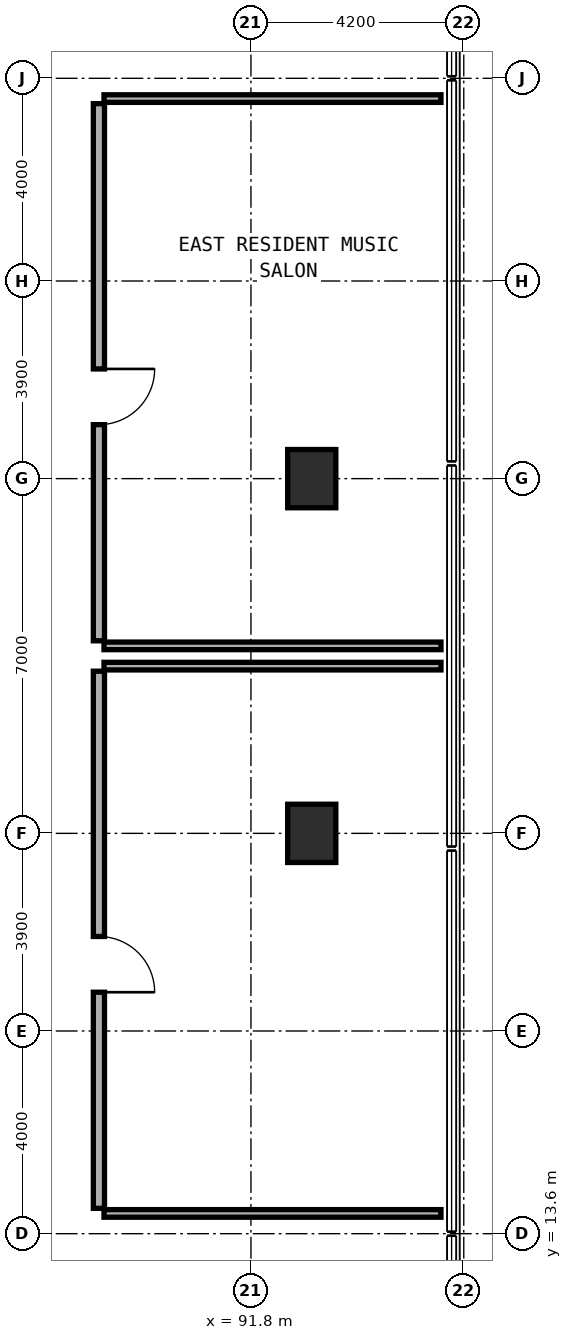
"""IFC4 building model, lengths in metres.
Left out: names, types, materials, properties, quantities, classifications, styles, units other than length and angle.
Written with IfcOpenShell. Run it as: python <this file> out.ifc"""

import sys

from ifc_helpers import new_model, si_unit, direction, frame, frame_2d, origin, origin_2d, place, context, subcontext, project, spatial, rectangle, extrude, element, fill, save


model = new_model("IFC4")
c1 = context("Model", 3, precision=1e-05, world=origin(), true_north=direction((0.0, 1.0)))
c2 = subcontext(c1, "Body", "Model", "MODEL_VIEW")
j1 = project(units=[si_unit("LENGTHUNIT", "METRE"), si_unit("PLANEANGLEUNIT", "RADIAN")], contexts=[c1])
p1 = place(None, origin())
s1 = spatial("IfcSite", under=j1, at=p1, CompositionType="ELEMENT")
p2 = place(p1, origin())
s2 = spatial("IfcBuilding", under=s1, at=p2, CompositionType="ELEMENT")
p3 = place(p2, frame((0.0, 0.0, 15.0)))
s3 = spatial("IfcBuildingStorey", under=s2, at=p3, CompositionType="ELEMENT", Elevation=15.0)
for number, where, z_axis, x_axis in (
    (1, (93.0, 21.5, 0.0), (0.0, 0.0, 1.0), (1.0, 0.0, 0.0)),
    (2, (93.0, 28.5, 0.0), (0.0, 0.0, 1.0), (1.0, 0.0, 0.0)),
):
    element("IfcColumn", number, at=place(p3, frame(where, z_axis=z_axis, x_axis=x_axis)), inside=s3, PredefinedType="COLUMN", context=c2, shape_type="SweptSolid", body=[
        extrude(rectangle(XDim=0.95, YDim=1.15, at=origin_2d()), origin(), (0.0, 0.0, 1.0), 4.5),
    ])
for number, where, z_axis, x_axis in (
    (3, (88.9, 14.0, 0.0), (0.0, 0.0, 1.0), (1.0, 0.0, 0.0)),
    (4, (88.9, 24.8, 0.0), (0.0, 0.0, 1.0), (1.0, 0.0, 0.0)),
):
    element("IfcWall", number, at=place(p3, frame(where, z_axis=z_axis, x_axis=x_axis)), inside=s3, PredefinedType="PARTITIONING", context=c2, shape_type="SweptSolid", body=[
        extrude(rectangle(XDim=6.65, YDim=0.15, at=frame_2d((3.325, 0.0))), origin(), (0.0, 0.0, 1.0), 3.715),
    ])
p4 = place(p3, frame((88.8, 14.1, 0.0), z_axis=(0.0, 0.0, 1.0), x_axis=(0.0, 1.0, 0.0)))
e5 = element("IfcWall", 5, at=p4, inside=s3, PredefinedType="SOLIDWALL", context=c2, shape_type="SweptSolid", body=[
    extrude(rectangle(XDim=10.6, YDim=0.22, at=frame_2d((5.3, 0.0))), origin(), (0.0, 0.0, 1.0), 3.575),
])
p5 = place(p4, frame((4.265, 0.0, 0.0)))
e6 = element("IfcOpeningElement", 6, at=p5, cuts=e5, PredefinedType="OPENING", context=c2, shape_type="SweptSolid", body=[
    extrude(rectangle(XDim=1.1, YDim=2.1, at=frame_2d((0.55, 1.05))), frame((0.0, 0.12, 0.0), z_axis=(0.0, -1.0, 0.0), x_axis=(1.0, 0.0, 0.0)), (0.0, 0.0, 1.0), 0.24),
])
for number, where, z_axis, x_axis in (
    (7, (88.9, 25.2, 0.0), (0.0, 0.0, 1.0), (1.0, 0.0, 0.0)),
    (8, (88.9, 36.0, 0.0), (0.0, 0.0, 1.0), (1.0, 0.0, 0.0)),
):
    element("IfcWall", number, at=place(p3, frame(where, z_axis=z_axis, x_axis=x_axis)), inside=s3, PredefinedType="PARTITIONING", context=c2, shape_type="SweptSolid", body=[
        extrude(rectangle(XDim=6.65, YDim=0.15, at=frame_2d((3.325, 0.0))), origin(), (0.0, 0.0, 1.0), 3.715),
    ])
p6 = place(p3, frame((88.8, 25.3, 0.0), z_axis=(0.0, 0.0, 1.0), x_axis=(0.0, 1.0, 0.0)))
e9 = element("IfcWall", 9, at=p6, inside=s3, PredefinedType="SOLIDWALL", context=c2, shape_type="SweptSolid", body=[
    extrude(rectangle(XDim=10.6, YDim=0.22, at=frame_2d((5.3, 0.0))), origin(), (0.0, 0.0, 1.0), 3.575),
])
p7 = place(p6, frame((4.265, 0.0, 0.0)))
e10 = element("IfcOpeningElement", 10, at=p7, cuts=e9, PredefinedType="OPENING", context=c2, shape_type="SweptSolid", body=[
    extrude(rectangle(XDim=1.1, YDim=2.1, at=frame_2d((0.55, 1.05))), frame((0.0, 0.12, 0.0), z_axis=(0.0, -1.0, 0.0), x_axis=(1.0, 0.0, 0.0)), (0.0, 0.0, 1.0), 0.24),
])
p8 = place(p5, frame((1.1, 0.0, 0.0), z_axis=(0.0, 0.0, 1.0), x_axis=(-1.0, 0.0, 0.0)))
e11 = element("IfcDoor", 11, at=p8, inside=s3, OperationType="SINGLE_SWING_RIGHT", PredefinedType="DOOR", context=c2, shape_type="SweptSolid", body=[
    extrude(rectangle(XDim=1.1, YDim=2.1, at=frame_2d((0.55, 1.05))), frame((0.0, 0.025, 0.0), z_axis=(0.0, -1.0, 0.0), x_axis=(1.0, 0.0, 0.0)), (0.0, 0.0, 1.0), 0.05),
])
fill(e6, e11)
p9 = place(p7, frame((1.1, 0.0, 0.0), z_axis=(0.0, 0.0, 1.0), x_axis=(-1.0, 0.0, 0.0)))
e12 = element("IfcDoor", 12, at=p9, inside=s3, OperationType="SINGLE_SWING_LEFT", PredefinedType="DOOR", context=c2, shape_type="SweptSolid", body=[
    extrude(rectangle(XDim=1.1, YDim=2.1, at=frame_2d((0.55, 1.05))), frame((0.0, 0.025, 0.0), z_axis=(0.0, -1.0, 0.0), x_axis=(1.0, 0.0, 0.0)), (0.0, 0.0, 1.0), 0.05),
])
fill(e10, e12)
save(model, sys.argv[1])
